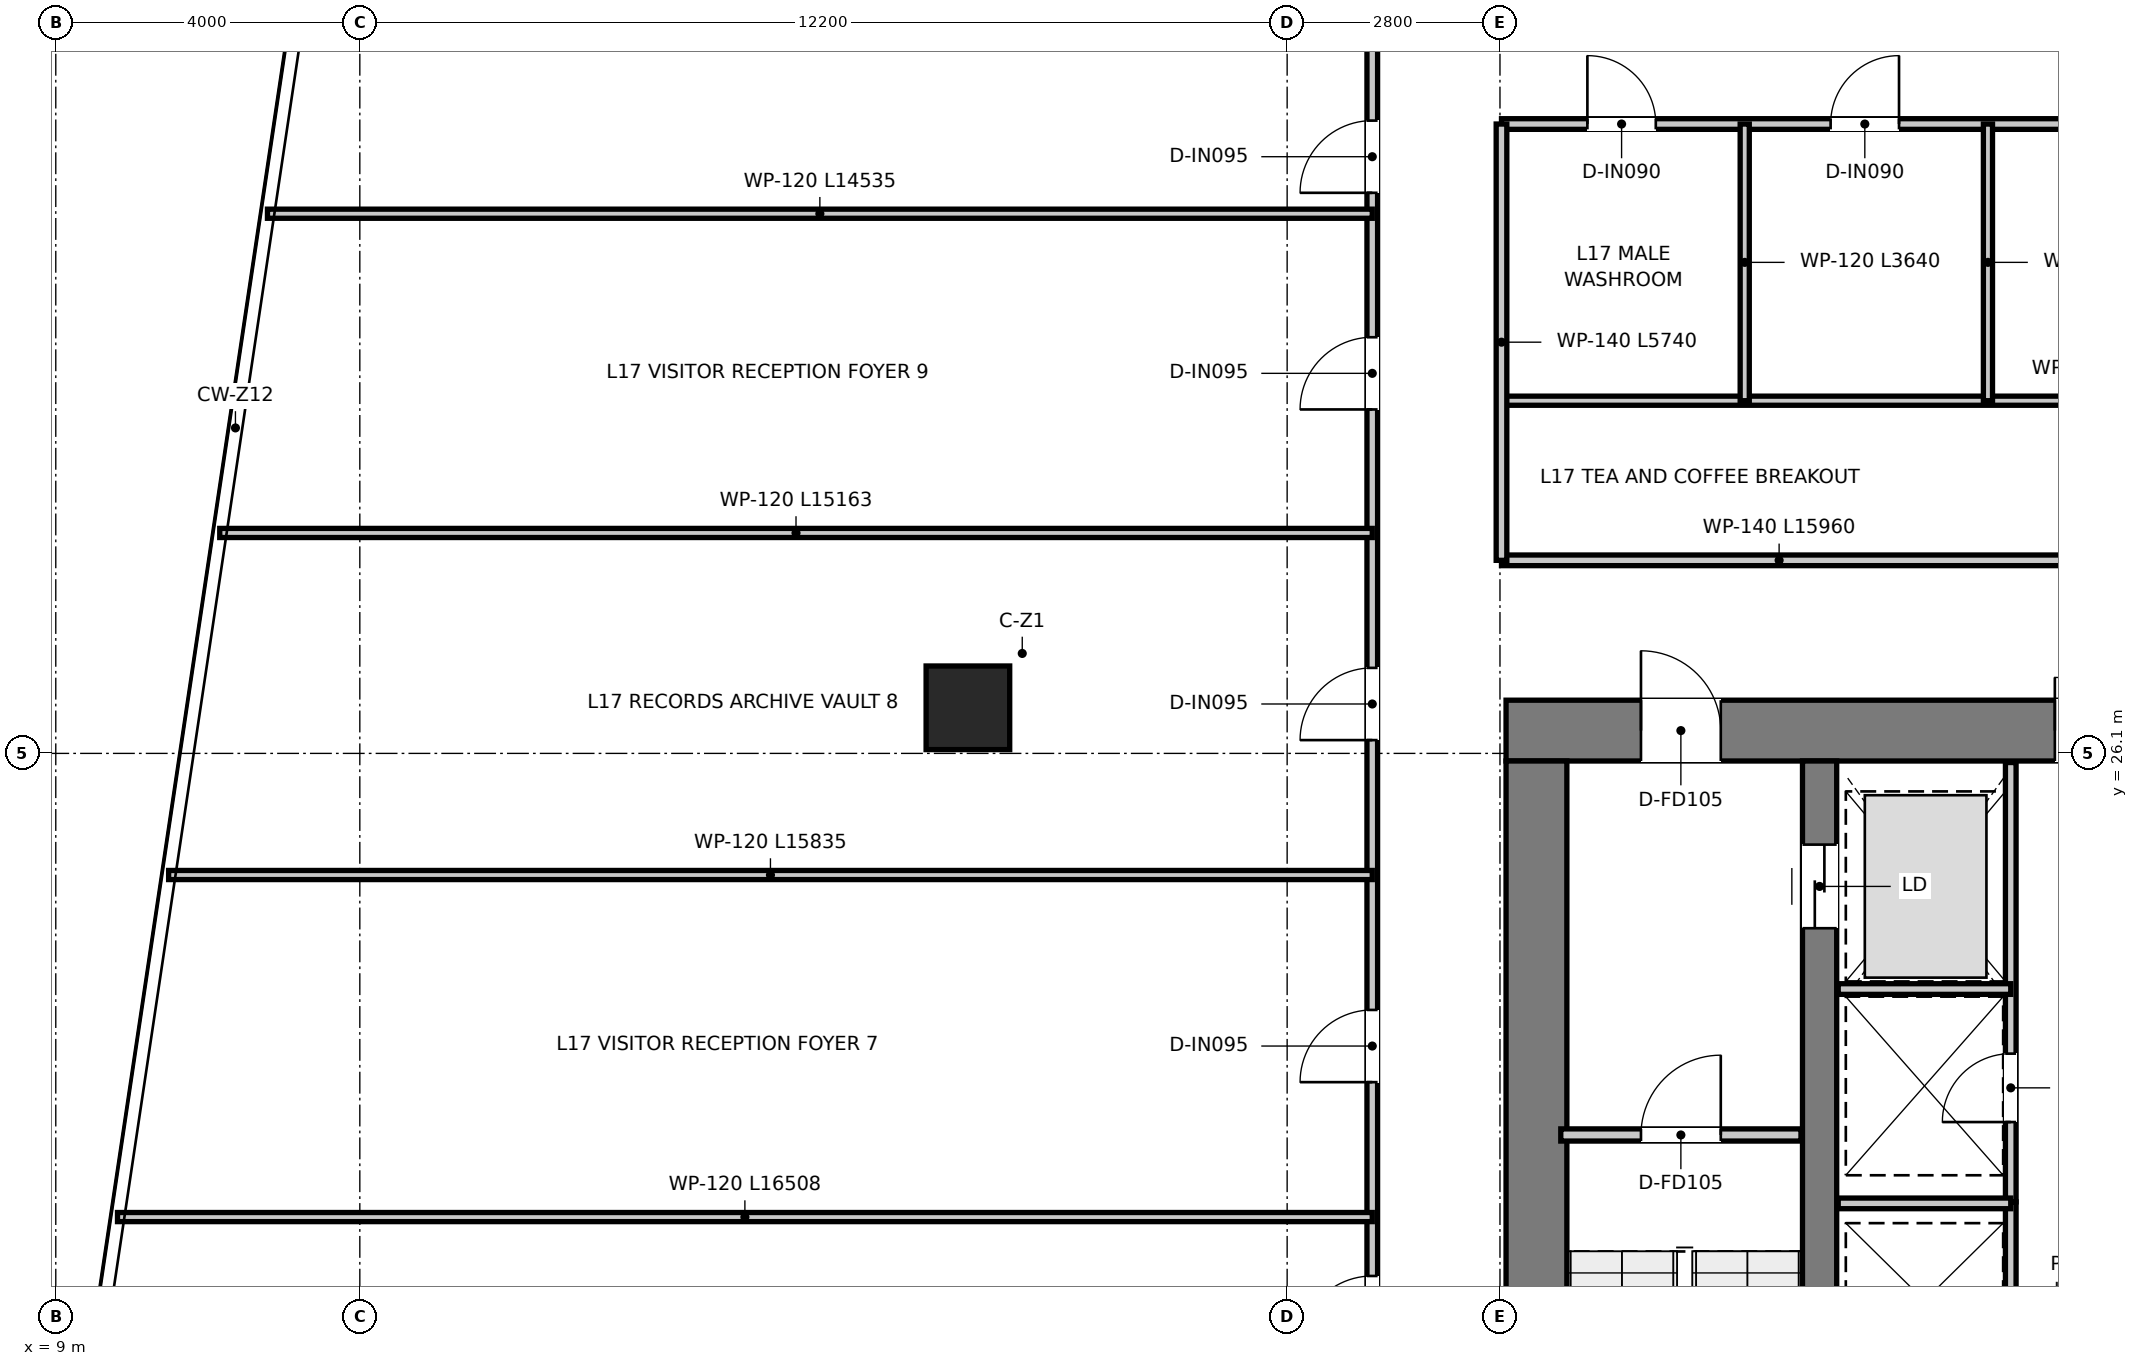
"""IFC4 building model, lengths in metres.
Left out: names, types, materials, properties, quantities, classifications, styles, units other than length and angle.
Written with IfcOpenShell. Run it as: python <this file> out.ifc"""

import sys

from ifc_helpers import new_model, si_unit, direction, frame, frame_2d, origin, origin_2d, place, context, subcontext, project, spatial, rectangle, extrude, source, transform, mapped, element, fill, save


model = new_model("IFC4")
c1 = context("Model", 3, precision=1e-05, world=origin(), true_north=direction((0.0, 1.0)))
c2 = subcontext(c1, "Body", "Model", "MODEL_VIEW")
j1 = project(units=[si_unit("LENGTHUNIT", "METRE"), si_unit("PLANEANGLEUNIT", "RADIAN")], contexts=[c1])
p1 = place(None, origin())
s1 = spatial("IfcSite", under=j1, at=p1, CompositionType="ELEMENT")
p2 = place(p1, origin())
s2 = spatial("IfcBuilding", under=s1, at=p2, CompositionType="ELEMENT")
p3 = place(p2, frame((0.0, 0.0, 72.4)))
s3 = spatial("IfcBuildingStorey", under=s2, at=p3, CompositionType="ELEMENT", Elevation=72.4)
p4 = place(p3, frame((28.08, 26.4, 0.0), z_axis=(0.0, 0.0, 1.0), x_axis=(1.0, 0.0, 0.0)))
e1 = element("IfcWall", 1, at=p4, inside=s3, PredefinedType="SHEAR", context=c2, shape_type="SweptSolid", body=[
    extrude(rectangle(XDim=15.84, YDim=0.8, at=frame_2d((7.92, 0.0))), origin(), (0.0, 0.0, 1.0), 3.95),
])
p5 = place(p4, frame((7.22, 0.0, 0.0)))
e2 = element("IfcOpeningElement", 2, at=p5, cuts=e1, PredefinedType="OPENING", context=c2, shape_type="SweptSolid", body=[
    extrude(rectangle(XDim=1.4, YDim=2.2, at=frame_2d((0.7, 1.1))), frame((0.0, 0.41, 0.0), z_axis=(0.0, -1.0, 0.0), x_axis=(1.0, 0.0, 0.0)), (0.0, 0.0, 1.0), 0.82),
])
p6 = place(p4, frame((1.775, 0.0, 0.0)))
e3 = element("IfcOpeningElement", 3, at=p6, cuts=e1, PredefinedType="OPENING", context=c2, shape_type="SweptSolid", body=[
    extrude(rectangle(XDim=1.05, YDim=2.1, at=frame_2d((0.525, 1.05))), frame((0.0, 0.41, 0.0), z_axis=(0.0, -1.0, 0.0), x_axis=(1.0, 0.0, 0.0)), (0.0, 0.0, 1.0), 0.82),
])
p7 = place(p4, frame((13.015, 0.0, 0.0)))
e4 = element("IfcOpeningElement", 4, at=p7, cuts=e1, PredefinedType="OPENING", context=c2, shape_type="SweptSolid", body=[
    extrude(rectangle(XDim=1.05, YDim=2.1, at=frame_2d((0.525, 1.05))), frame((0.0, 0.41, 0.0), z_axis=(0.0, -1.0, 0.0), x_axis=(1.0, 0.0, 0.0)), (0.0, 0.0, 1.0), 0.82),
])
p8 = place(p3, frame((28.48, 11.3, 0.0), z_axis=(0.0, 0.0, 1.0), x_axis=(0.0, 1.0, 0.0)))
e5 = element("IfcWall", 5, at=p8, inside=s3, PredefinedType="SHEAR", context=c2, shape_type="SweptSolid", body=[
    extrude(rectangle(XDim=14.7, YDim=0.8, at=frame_2d((7.35, 0.0))), origin(), (0.0, 0.0, 1.0), 3.95),
])
p9 = place(p3, frame((32.205, 13.22, 0.0), z_axis=(0.0, 0.0, 1.0), x_axis=(0.0, 1.0, 0.0)))
e6 = element("IfcWall", 6, at=p9, inside=s3, PredefinedType="SHEAR", context=c2, shape_type="SweptSolid", body=[
    extrude(rectangle(XDim=12.78, YDim=0.45, at=frame_2d((6.39, 0.0))), origin(), (0.0, 0.0, 1.0), 3.95),
])
p10 = place(p9, frame((10.58, 0.0, 0.0)))
e7 = element("IfcOpeningElement", 7, at=p10, cuts=e6, PredefinedType="OPENING", context=c2, shape_type="SweptSolid", body=[
    extrude(rectangle(XDim=1.1, YDim=2.15, at=frame_2d((0.55, 1.075))), frame((0.0, 0.235, 0.0), z_axis=(0.0, -1.0, 0.0), x_axis=(1.0, 0.0, 0.0)), (0.0, 0.0, 1.0), 0.47),
])
m1 = source(origin(), c2, "Body", "SweptSolid", [
    extrude(rectangle(XDim=1.1, YDim=1.1, at=origin_2d()), origin(), (0.0, 0.0, 1.0), 3.95),
])
p11 = place(p3, frame((21.0, 26.7, 0.0), z_axis=(0.0, 0.0, 1.0), x_axis=(1.0, 0.0, 0.0)))
e8 = element("IfcColumn", 8, at=p11, inside=s3, PredefinedType="COLUMN", context=c2, shape_type="MappedRepresentation", body=[
    mapped(m1, transform((0.0, 0.0, 0.0), x_axis=(1.0, 0.0, 0.0), y_axis=(0.0, 1.0, 0.0), z_axis=(0.0, 0.0, 1.0), scale=1.0)),
])
p12 = place(p3, frame((28.8, 21.08, 0.0), z_axis=(0.0, 0.0, 1.0), x_axis=(1.0, 0.0, 0.0)))
e9 = element("IfcWall", 9, at=p12, inside=s3, PredefinedType="PARTITIONING", context=c2, shape_type="SweptSolid", body=[
    extrude(rectangle(XDim=3.16, YDim=0.16, at=frame_2d((1.58, 0.0))), origin(), (0.0, 0.0, 1.0), 3.67),
])
p13 = place(p12, frame((1.055, 0.0, 0.0)))
e10 = element("IfcOpeningElement", 10, at=p13, cuts=e9, PredefinedType="OPENING", context=c2, shape_type="SweptSolid", body=[
    extrude(rectangle(XDim=1.05, YDim=2.1, at=frame_2d((0.525, 1.05))), frame((0.0, 0.09, 0.0), z_axis=(0.0, -1.0, 0.0), x_axis=(1.0, 0.0, 0.0)), (0.0, 0.0, 1.0), 0.18),
])
p14 = place(p3, frame((34.72, 20.2, 0.0), z_axis=(0.0, 0.0, 1.0), x_axis=(0.0, 1.0, 0.0)))
e11 = element("IfcWall", 11, at=p14, inside=s3, PredefinedType="PARTITIONING", context=c2, shape_type="SweptSolid", body=[
    extrude(rectangle(XDim=5.78, YDim=0.14, at=frame_2d((2.89, 0.0))), origin(), (0.0, 0.0, 1.0), 2.47),
])
p15 = place(p14, frame((1.05, 0.0, 0.0)))
e12 = element("IfcOpeningElement", 12, at=p15, cuts=e11, PredefinedType="OPENING", context=c2, shape_type="SweptSolid", body=[
    extrude(rectangle(XDim=0.9, YDim=2.1, at=frame_2d((0.45, 1.05))), frame((0.0, 0.08, 0.0), z_axis=(0.0, -1.0, 0.0), x_axis=(1.0, 0.0, 0.0)), (0.0, 0.0, 1.0), 0.16),
])
p16 = place(p3, frame((32.45, 23.0, 0.0), z_axis=(0.0, 0.0, 1.0), x_axis=(1.0, 0.0, 0.0)))
e13 = element("IfcWall", 13, at=p16, inside=s3, PredefinedType="PARTITIONING", context=c2, shape_type="SweptSolid", body=[
    extrude(rectangle(XDim=2.27, YDim=0.14, at=frame_2d((1.135, 0.0))), origin(), (0.0, 0.0, 1.0), 2.47),
])
p17 = place(p3, frame((34.72, 17.78, 0.0), z_axis=(0.0, 0.0, 1.0), x_axis=(0.0, 1.0, 0.0)))
e14 = element("IfcWall", 14, at=p17, inside=s3, PredefinedType="PARTITIONING", context=c2, shape_type="SweptSolid", body=[
    extrude(rectangle(XDim=2.42, YDim=0.14, at=frame_2d((1.21, 0.0))), origin(), (0.0, 0.0, 1.0), 3.67),
])
p18 = place(p3, frame((32.45, 20.18, 0.0), z_axis=(0.0, 0.0, 1.0), x_axis=(1.0, 0.0, 0.0)))
e15 = element("IfcWall", 15, at=p18, inside=s3, PredefinedType="PARTITIONING", context=c2, shape_type="SweptSolid", body=[
    extrude(rectangle(XDim=2.27, YDim=0.14, at=frame_2d((1.135, 0.0))), origin(), (0.0, 0.0, 1.0), 3.67),
])
p19 = place(p3, frame((28.02, 28.64, 0.0), z_axis=(0.0, 0.0, 1.0), x_axis=(1.0, 0.0, 0.0)))
e16 = element("IfcWall", 16, at=p19, inside=s3, PredefinedType="PARTITIONING", context=c2, shape_type="SweptSolid", body=[
    extrude(rectangle(XDim=15.96, YDim=0.14, at=frame_2d((7.98, 0.0))), origin(), (0.0, 0.0, 1.0), 3.08),
])
p20 = place(p19, frame((7.455, 0.0, 0.0)))
e17 = element("IfcOpeningElement", 17, at=p20, cuts=e16, PredefinedType="OPENING", context=c2, shape_type="SweptSolid", body=[
    extrude(rectangle(XDim=1.05, YDim=2.15, at=frame_2d((0.525, 1.075))), frame((0.0, 0.08, 0.0), z_axis=(0.0, -1.0, 0.0), x_axis=(1.0, 0.0, 0.0)), (0.0, 0.0, 1.0), 0.16),
])
p21 = place(p3, frame((28.02, 30.74, 0.0), z_axis=(0.0, 0.0, 1.0), x_axis=(1.0, 0.0, 0.0)))
e18 = element("IfcWall", 18, at=p21, inside=s3, PredefinedType="PARTITIONING", context=c2, shape_type="SweptSolid", body=[
    extrude(rectangle(XDim=15.96, YDim=0.12, at=frame_2d((7.98, 0.0))), origin(), (0.0, 0.0, 1.0), 3.08),
])
p22 = place(p3, frame((28.02, 34.38, 0.0), z_axis=(0.0, 0.0, 1.0), x_axis=(1.0, 0.0, 0.0)))
e19 = element("IfcWall", 19, at=p22, inside=s3, PredefinedType="PARTITIONING", context=c2, shape_type="SweptSolid", body=[
    extrude(rectangle(XDim=15.96, YDim=0.14, at=frame_2d((7.98, 0.0))), origin(), (0.0, 0.0, 1.0), 3.08),
])
p23 = place(p22, frame((1.13, 0.0, 0.0)))
e20 = element("IfcOpeningElement", 20, at=p23, cuts=e19, PredefinedType="OPENING", context=c2, shape_type="SweptSolid", body=[
    extrude(rectangle(XDim=0.9, YDim=2.1, at=frame_2d((0.45, 1.05))), frame((0.0, 0.08, 0.0), z_axis=(0.0, -1.0, 0.0), x_axis=(1.0, 0.0, 0.0)), (0.0, 0.0, 1.0), 0.16),
])
p24 = place(p22, frame((4.33, 0.0, 0.0)))
e21 = element("IfcOpeningElement", 21, at=p24, cuts=e19, PredefinedType="OPENING", context=c2, shape_type="SweptSolid", body=[
    extrude(rectangle(XDim=0.9, YDim=2.1, at=frame_2d((0.45, 1.05))), frame((0.0, 0.08, 0.0), z_axis=(0.0, -1.0, 0.0), x_axis=(1.0, 0.0, 0.0)), (0.0, 0.0, 1.0), 0.16),
])
p25 = place(p22, frame((7.355, 0.0, 0.0)))
e22 = element("IfcOpeningElement", 22, at=p25, cuts=e19, PredefinedType="OPENING", context=c2, shape_type="SweptSolid", body=[
    extrude(rectangle(XDim=0.95, YDim=2.1, at=frame_2d((0.475, 1.05))), frame((0.0, 0.08, 0.0), z_axis=(0.0, -1.0, 0.0), x_axis=(1.0, 0.0, 0.0)), (0.0, 0.0, 1.0), 0.16),
])
p26 = place(p22, frame((12.23, 0.0, 0.0)))
e23 = element("IfcOpeningElement", 23, at=p26, cuts=e19, PredefinedType="OPENING", context=c2, shape_type="SweptSolid", body=[
    extrude(rectangle(XDim=0.95, YDim=2.1, at=frame_2d((0.475, 1.05))), frame((0.0, 0.08, 0.0), z_axis=(0.0, -1.0, 0.0), x_axis=(1.0, 0.0, 0.0)), (0.0, 0.0, 1.0), 0.16),
])
p27 = place(p3, frame((28.02, 28.64, 0.0), z_axis=(0.0, 0.0, 1.0), x_axis=(0.0, 1.0, 0.0)))
e24 = element("IfcWall", 24, at=p27, inside=s3, PredefinedType="PARTITIONING", context=c2, shape_type="SweptSolid", body=[
    extrude(rectangle(XDim=5.74, YDim=0.14, at=frame_2d((2.87, 0.0))), origin(), (0.0, 0.0, 1.0), 3.22),
])
for number, where, z_axis, x_axis in (
    (25, (31.22, 30.74, 0.0), (0.0, 0.0, 1.0), (0.0, 1.0, 0.0)),
    (26, (34.42, 30.74, 0.0), (0.0, 0.0, 1.0), (0.0, 1.0, 0.0)),
):
    element("IfcWall", number, at=place(p3, frame(where, z_axis=z_axis, x_axis=x_axis)), inside=s3, PredefinedType="PARTITIONING", context=c2, shape_type="SweptSolid", body=[
        extrude(rectangle(XDim=3.64, YDim=0.12, at=frame_2d((1.82, 0.0))), origin(), (0.0, 0.0, 1.0), 3.12),
    ])
p28 = place(p3, frame((26.32, 10.5, 0.0), z_axis=(0.0, 0.0, 1.0), x_axis=(0.0, 1.0, 0.0)))
e27 = element("IfcWall", 27, at=p28, inside=s3, PredefinedType="PARTITIONING", context=c2, shape_type="SweptSolid", body=[
    extrude(rectangle(XDim=25.62, YDim=0.14, at=frame_2d((12.81, 0.0))), origin(), (0.0, 0.0, 1.0), 2.97),
])
p29 = place(p28, frame((7.775, 0.0, 0.0)))
e28 = element("IfcOpeningElement", 28, at=p29, cuts=e27, PredefinedType="OPENING", context=c2, shape_type="SweptSolid", body=[
    extrude(rectangle(XDim=0.95, YDim=2.1, at=frame_2d((0.475, 1.05))), frame((0.0, 0.08, 0.0), z_axis=(0.0, -1.0, 0.0), x_axis=(1.0, 0.0, 0.0)), (0.0, 0.0, 1.0), 0.16),
])
p30 = place(p28, frame((11.275, 0.0, 0.0)))
e29 = element("IfcOpeningElement", 29, at=p30, cuts=e27, PredefinedType="OPENING", context=c2, shape_type="SweptSolid", body=[
    extrude(rectangle(XDim=0.95, YDim=2.1, at=frame_2d((0.475, 1.05))), frame((0.0, 0.08, 0.0), z_axis=(0.0, -1.0, 0.0), x_axis=(1.0, 0.0, 0.0)), (0.0, 0.0, 1.0), 0.16),
])
p31 = place(p28, frame((15.775, 0.0, 0.0)))
e30 = element("IfcOpeningElement", 30, at=p31, cuts=e27, PredefinedType="OPENING", context=c2, shape_type="SweptSolid", body=[
    extrude(rectangle(XDim=0.95, YDim=2.1, at=frame_2d((0.475, 1.05))), frame((0.0, 0.08, 0.0), z_axis=(0.0, -1.0, 0.0), x_axis=(1.0, 0.0, 0.0)), (0.0, 0.0, 1.0), 0.16),
])
p32 = place(p28, frame((20.125, 0.0, 0.0)))
e31 = element("IfcOpeningElement", 31, at=p32, cuts=e27, PredefinedType="OPENING", context=c2, shape_type="SweptSolid", body=[
    extrude(rectangle(XDim=0.95, YDim=2.1, at=frame_2d((0.475, 1.05))), frame((0.0, 0.08, 0.0), z_axis=(0.0, -1.0, 0.0), x_axis=(1.0, 0.0, 0.0)), (0.0, 0.0, 1.0), 0.16),
])
p33 = place(p28, frame((22.975, 0.0, 0.0)))
e32 = element("IfcOpeningElement", 32, at=p33, cuts=e27, PredefinedType="OPENING", context=c2, shape_type="SweptSolid", body=[
    extrude(rectangle(XDim=0.95, YDim=2.1, at=frame_2d((0.475, 1.05))), frame((0.0, 0.08, 0.0), z_axis=(0.0, -1.0, 0.0), x_axis=(1.0, 0.0, 0.0)), (0.0, 0.0, 1.0), 0.16),
])
p34 = place(p3, frame((9.812, 20.0, 0.0), z_axis=(0.0, 0.0, 1.0), x_axis=(1.0, 0.0, 0.0)))
e33 = element("IfcWall", 33, at=p34, inside=s3, PredefinedType="PARTITIONING", context=c2, shape_type="SweptSolid", body=[
    extrude(rectangle(XDim=16.508, YDim=0.12, at=frame_2d((8.254, 0.0))), origin(), (0.0, 0.0, 1.0), 2.97),
])
p35 = place(p3, frame((10.485, 24.5, 0.0), z_axis=(0.0, 0.0, 1.0), x_axis=(1.0, 0.0, 0.0)))
e34 = element("IfcWall", 34, at=p35, inside=s3, PredefinedType="PARTITIONING", context=c2, shape_type="SweptSolid", body=[
    extrude(rectangle(XDim=15.835, YDim=0.12, at=frame_2d((7.918, 0.0))), origin(), (0.0, 0.0, 1.0), 2.97),
])
p36 = place(p3, frame((11.157, 29.0, 0.0), z_axis=(0.0, 0.0, 1.0), x_axis=(1.0, 0.0, 0.0)))
e35 = element("IfcWall", 35, at=p36, inside=s3, PredefinedType="PARTITIONING", context=c2, shape_type="SweptSolid", body=[
    extrude(rectangle(XDim=15.163, YDim=0.12, at=frame_2d((7.582, 0.0))), origin(), (0.0, 0.0, 1.0), 2.97),
])
p37 = place(p3, frame((11.785, 33.2, 0.0), z_axis=(0.0, 0.0, 1.0), x_axis=(1.0, 0.0, 0.0)))
e36 = element("IfcWall", 36, at=p37, inside=s3, PredefinedType="PARTITIONING", context=c2, shape_type="SweptSolid", body=[
    extrude(rectangle(XDim=14.535, YDim=0.12, at=frame_2d((7.268, 0.0))), origin(), (0.0, 0.0, 1.0), 2.97),
])
p38 = place(p13, origin())
e37 = element("IfcDoor", 37, at=p38, inside=s3, OperationType="SINGLE_SWING_RIGHT", PredefinedType="DOOR", context=c2, shape_type="SweptSolid", body=[
    extrude(rectangle(XDim=1.05, YDim=2.1, at=frame_2d((0.525, 1.05))), frame((0.0, 0.025, 0.0), z_axis=(0.0, -1.0, 0.0), x_axis=(1.0, 0.0, 0.0)), (0.0, 0.0, 1.0), 0.05),
])
fill(e10, e37)
p39 = place(p5, origin())
e38 = element("IfcDoor", 38, at=p39, inside=s3, OperationType="DOUBLE_DOOR_SINGLE_SWING", PredefinedType="DOOR", context=c2, shape_type="SweptSolid", body=[
    extrude(rectangle(XDim=1.4, YDim=2.2, at=frame_2d((0.7, 1.1))), frame((0.0, 0.025, 0.0), z_axis=(0.0, -1.0, 0.0), x_axis=(1.0, 0.0, 0.0)), (0.0, 0.0, 1.0), 0.05),
])
fill(e2, e38)
p40 = place(p6, origin())
e39 = element("IfcDoor", 39, at=p40, inside=s3, OperationType="SINGLE_SWING_LEFT", PredefinedType="DOOR", context=c2, shape_type="SweptSolid", body=[
    extrude(rectangle(XDim=1.05, YDim=2.1, at=frame_2d((0.525, 1.05))), frame((0.0, 0.025, 0.0), z_axis=(0.0, -1.0, 0.0), x_axis=(1.0, 0.0, 0.0)), (0.0, 0.0, 1.0), 0.05),
])
fill(e3, e39)
p41 = place(p10, origin())
e40 = element("IfcDoor", 40, at=p41, inside=s3, OperationType="DOUBLE_DOOR_SLIDING", PredefinedType="DOOR", context=c2, shape_type="SweptSolid", body=[
    extrude(rectangle(XDim=1.1, YDim=2.15, at=frame_2d((0.55, 1.075))), frame((0.0, 0.025, 0.0), z_axis=(0.0, -1.0, 0.0), x_axis=(1.0, 0.0, 0.0)), (0.0, 0.0, 1.0), 0.05),
])
fill(e7, e40)
p42 = place(p15, origin())
e41 = element("IfcDoor", 41, at=p42, inside=s3, OperationType="SINGLE_SWING_LEFT", PredefinedType="DOOR", context=c2, shape_type="SweptSolid", body=[
    extrude(rectangle(XDim=0.9, YDim=2.1, at=frame_2d((0.45, 1.05))), frame((0.0, 0.025, 0.0), z_axis=(0.0, -1.0, 0.0), x_axis=(1.0, 0.0, 0.0)), (0.0, 0.0, 1.0), 0.05),
])
fill(e12, e41)
p43 = place(p23, origin())
e42 = element("IfcDoor", 42, at=p43, inside=s3, OperationType="SINGLE_SWING_LEFT", PredefinedType="DOOR", context=c2, shape_type="SweptSolid", body=[
    extrude(rectangle(XDim=0.9, YDim=2.1, at=frame_2d((0.45, 1.05))), frame((0.0, 0.025, 0.0), z_axis=(0.0, -1.0, 0.0), x_axis=(1.0, 0.0, 0.0)), (0.0, 0.0, 1.0), 0.05),
])
fill(e20, e42)
p44 = place(p24, origin())
e43 = element("IfcDoor", 43, at=p44, inside=s3, OperationType="SINGLE_SWING_RIGHT", PredefinedType="DOOR", context=c2, shape_type="SweptSolid", body=[
    extrude(rectangle(XDim=0.9, YDim=2.1, at=frame_2d((0.45, 1.05))), frame((0.0, 0.025, 0.0), z_axis=(0.0, -1.0, 0.0), x_axis=(1.0, 0.0, 0.0)), (0.0, 0.0, 1.0), 0.05),
])
fill(e21, e43)
p45 = place(p29, origin())
e44 = element("IfcDoor", 44, at=p45, inside=s3, OperationType="SINGLE_SWING_LEFT", PredefinedType="DOOR", context=c2, shape_type="SweptSolid", body=[
    extrude(rectangle(XDim=0.95, YDim=2.1, at=frame_2d((0.475, 1.05))), frame((0.0, 0.025, 0.0), z_axis=(0.0, -1.0, 0.0), x_axis=(1.0, 0.0, 0.0)), (0.0, 0.0, 1.0), 0.05),
])
fill(e28, e44)
p46 = place(p30, origin())
e45 = element("IfcDoor", 45, at=p46, inside=s3, OperationType="SINGLE_SWING_LEFT", PredefinedType="DOOR", context=c2, shape_type="SweptSolid", body=[
    extrude(rectangle(XDim=0.95, YDim=2.1, at=frame_2d((0.475, 1.05))), frame((0.0, 0.025, 0.0), z_axis=(0.0, -1.0, 0.0), x_axis=(1.0, 0.0, 0.0)), (0.0, 0.0, 1.0), 0.05),
])
fill(e29, e45)
p47 = place(p31, origin())
e46 = element("IfcDoor", 46, at=p47, inside=s3, OperationType="SINGLE_SWING_LEFT", PredefinedType="DOOR", context=c2, shape_type="SweptSolid", body=[
    extrude(rectangle(XDim=0.95, YDim=2.1, at=frame_2d((0.475, 1.05))), frame((0.0, 0.025, 0.0), z_axis=(0.0, -1.0, 0.0), x_axis=(1.0, 0.0, 0.0)), (0.0, 0.0, 1.0), 0.05),
])
fill(e30, e46)
p48 = place(p32, origin())
e47 = element("IfcDoor", 47, at=p48, inside=s3, OperationType="SINGLE_SWING_LEFT", PredefinedType="DOOR", context=c2, shape_type="SweptSolid", body=[
    extrude(rectangle(XDim=0.95, YDim=2.1, at=frame_2d((0.475, 1.05))), frame((0.0, 0.025, 0.0), z_axis=(0.0, -1.0, 0.0), x_axis=(1.0, 0.0, 0.0)), (0.0, 0.0, 1.0), 0.05),
])
fill(e31, e47)
p49 = place(p33, origin())
e48 = element("IfcDoor", 48, at=p49, inside=s3, OperationType="SINGLE_SWING_LEFT", PredefinedType="DOOR", context=c2, shape_type="SweptSolid", body=[
    extrude(rectangle(XDim=0.95, YDim=2.1, at=frame_2d((0.475, 1.05))), frame((0.0, 0.025, 0.0), z_axis=(0.0, -1.0, 0.0), x_axis=(1.0, 0.0, 0.0)), (0.0, 0.0, 1.0), 0.05),
])
fill(e32, e48)
save(model, sys.argv[1])
